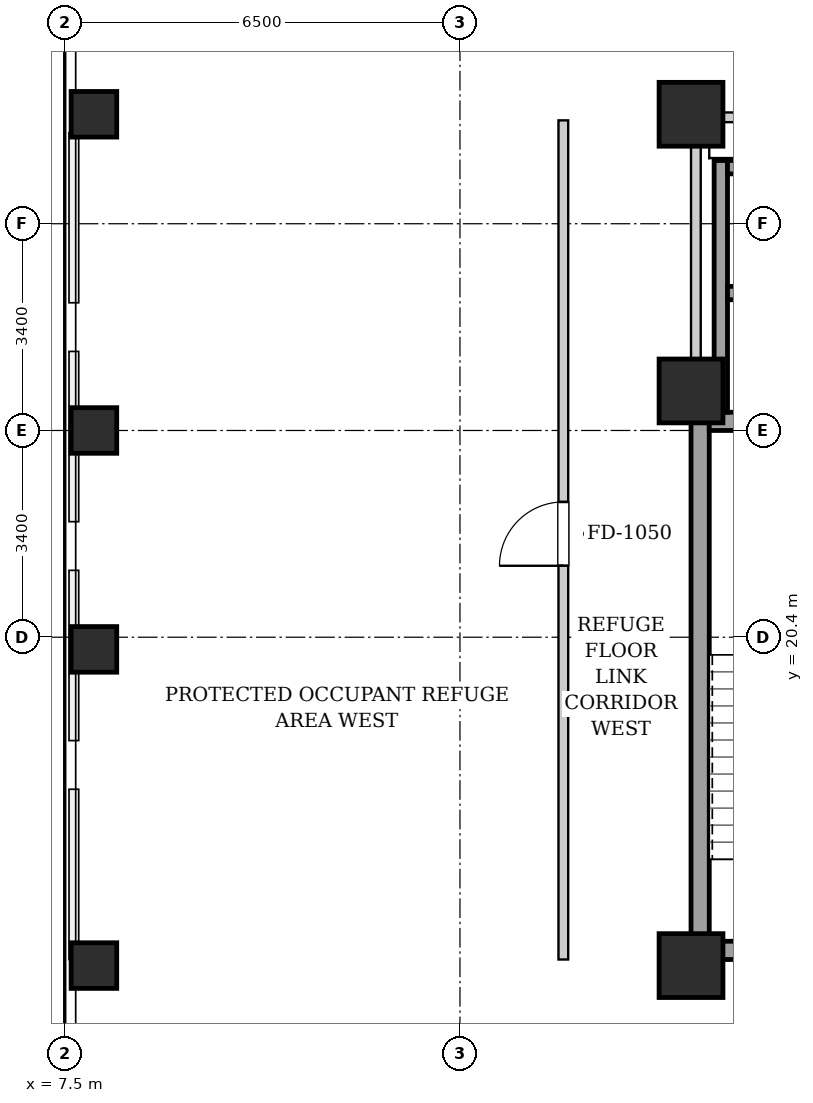
"""IFC4 building model, lengths in metres.
Left out: names, types, materials, properties, quantities, classifications, styles, units other than length and angle.
Written with IfcOpenShell. Run it as: python <this file> out.ifc"""

import sys

from ifc_helpers import new_model, si_unit, direction, frame, frame_2d, origin, origin_2d, place, context, subcontext, project, spatial, rectangle, extrude, element, fill, save


model = new_model("IFC4")
c1 = context("Model", 3, precision=1e-05, world=origin(), true_north=direction((0.0, 1.0)))
c2 = subcontext(c1, "Body", "Model", "MODEL_VIEW")
j1 = project(units=[si_unit("LENGTHUNIT", "METRE"), si_unit("PLANEANGLEUNIT", "RADIAN")], contexts=[c1])
p1 = place(None, origin())
s1 = spatial("IfcSite", under=j1, at=p1, CompositionType="ELEMENT")
p2 = place(p1, origin())
s2 = spatial("IfcBuilding", under=s1, at=p2, CompositionType="ELEMENT")
p3 = place(p2, frame((0.0, 0.0, 119.9)))
s3 = spatial("IfcBuildingStorey", under=s2, at=p3, CompositionType="ELEMENT", Elevation=119.9)
for number, where, z_axis, x_axis in (
    (1, (7.98, 15.0, 0.0), (0.0, 0.0, 1.0), (1.0, 0.0, 0.0)),
    (2, (7.98, 20.2, 0.0), (0.0, 0.0, 1.0), (1.0, 0.0, 0.0)),
    (3, (7.98, 23.8, 0.0), (0.0, 0.0, 1.0), (1.0, 0.0, 0.0)),
    (4, (7.98, 29.0, 0.0), (0.0, 0.0, 1.0), (1.0, 0.0, 0.0)),
):
    element("IfcColumn", number, at=place(p3, frame(where, z_axis=z_axis, x_axis=x_axis)), inside=s3, PredefinedType="COLUMN", context=c2, shape_type="SweptSolid", body=[
        extrude(rectangle(XDim=0.75, YDim=0.75, at=origin_2d()), origin(), (0.0, 0.0, 1.0), 4.5),
    ])
for number, where, z_axis, x_axis in (
    (5, (17.8, 15.0, 0.0), (0.0, 0.0, 1.0), (1.0, 0.0, 0.0)),
    (6, (17.8, 29.0, 0.0), (0.0, 0.0, 1.0), (1.0, 0.0, 0.0)),
    (7, (17.8, 24.45, 0.0), (0.0, 0.0, 1.0), (1.0, 0.0, 0.0)),
):
    element("IfcColumn", number, at=place(p3, frame(where, z_axis=z_axis, x_axis=x_axis)), inside=s3, PredefinedType="COLUMN", context=c2, shape_type="SweptSolid", body=[
        extrude(rectangle(XDim=1.05, YDim=1.05, at=origin_2d()), origin(), (0.0, 0.0, 1.0), 4.5),
    ])
p4 = place(p3, frame((17.95, 15.1, 0.0), z_axis=(0.0, 0.0, 1.0), x_axis=(0.0, 1.0, 0.0)))
e8 = element("IfcWall", 8, at=p4, inside=s3, PredefinedType="SHEAR", context=c2, shape_type="SweptSolid", body=[
    extrude(rectangle(XDim=9.0, YDim=0.3, at=frame_2d((4.5, 0.0))), origin(), (0.0, 0.0, 1.0), 4.18),
])
p5 = place(p3, frame((18.1, 23.95, 0.0), z_axis=(0.0, 0.0, 1.0), x_axis=(1.0, 0.0, 0.0)))
e9 = element("IfcWall", 9, at=p5, inside=s3, PredefinedType="SHEAR", context=c2, shape_type="SweptSolid", body=[
    extrude(rectangle(XDim=2.85, YDim=0.3, at=frame_2d((1.425, 0.0))), origin(), (0.0, 0.0, 1.0), 4.18),
])
p6 = place(p3, frame((18.1, 15.25, 0.0), z_axis=(0.0, 0.0, 1.0), x_axis=(1.0, 0.0, 0.0)))
e10 = element("IfcWall", 10, at=p6, inside=s3, PredefinedType="SHEAR", context=c2, shape_type="SweptSolid", body=[
    extrude(rectangle(XDim=2.85, YDim=0.3, at=frame_2d((1.425, 0.0))), origin(), (0.0, 0.0, 1.0), 4.18),
])
p7 = place(p6, frame((0.86, 0.0, 0.0)))
e11 = element("IfcOpeningElement", 11, at=p7, cuts=e10, PredefinedType="OPENING", context=c2, shape_type="SweptSolid", body=[
    extrude(rectangle(XDim=1.1, YDim=2.05, at=frame_2d((0.55, 1.025))), frame((0.0, 0.16, 0.0), z_axis=(0.0, -1.0, 0.0), x_axis=(1.0, 0.0, 0.0)), (0.0, 0.0, 1.0), 0.32),
])
p8 = place(p3, frame((18.29, 24.1, 0.0), z_axis=(0.0, 0.0, 1.0), x_axis=(0.0, 1.0, 0.0)))
e12 = element("IfcWall", 12, at=p8, inside=s3, PredefinedType="SHEAR", context=c2, shape_type="SweptSolid", body=[
    extrude(rectangle(XDim=4.14, YDim=0.22, at=frame_2d((2.07, 0.0))), origin(), (0.0, 0.0, 1.0), 4.18),
])
for number, where, z_axis, x_axis in (
    (13, (18.4, 26.06, 0.0), (0.0, 0.0, 1.0), (1.0, 0.0, 0.0)),
    (14, (18.4, 28.13, 0.0), (0.0, 0.0, 1.0), (1.0, 0.0, 0.0)),
):
    element("IfcWall", number, at=place(p3, frame(where, z_axis=z_axis, x_axis=x_axis)), inside=s3, PredefinedType="SHEAR", context=c2, shape_type="SweptSolid", body=[
        extrude(rectangle(XDim=1.9, YDim=0.22, at=frame_2d((0.95, 0.0))), origin(), (0.0, 0.0, 1.0), 4.18),
    ])
p9 = place(p3, frame((17.88, 24.12, 0.0), z_axis=(0.0, 0.0, 1.0), x_axis=(0.0, 1.0, 0.0)))
e15 = element("IfcWall", 15, at=p9, inside=s3, PredefinedType="PARTITIONING", context=c2, shape_type="SweptSolid", body=[
    extrude(rectangle(XDim=4.76, YDim=0.16, at=frame_2d((2.38, 0.0))), origin(), (0.0, 0.0, 1.0), 4.18),
])
p10 = place(p3, frame((17.96, 28.95, 0.0), z_axis=(0.0, 0.0, 1.0), x_axis=(1.0, 0.0, 0.0)))
e16 = element("IfcWall", 16, at=p10, inside=s3, PredefinedType="PARTITIONING", context=c2, shape_type="SweptSolid", body=[
    extrude(rectangle(XDim=4.29, YDim=0.16, at=frame_2d((2.145, 0.0))), origin(), (0.0, 0.0, 1.0), 4.18),
])
p11 = place(p10, frame((1.645, 0.0, 0.0)))
e17 = element("IfcOpeningElement", 17, at=p11, cuts=e16, PredefinedType="OPENING", context=c2, shape_type="SweptSolid", body=[
    extrude(rectangle(XDim=0.86, YDim=2.05, at=frame_2d((0.43, 1.025))), frame((0.0, 0.09, 0.0), z_axis=(0.0, -1.0, 0.0), x_axis=(1.0, 0.0, 0.0)), (0.0, 0.0, 1.0), 0.18),
])
p12 = place(p3, frame((15.7, 15.1, 0.0), z_axis=(0.0, 0.0, 1.0), x_axis=(0.0, 1.0, 0.0)))
e18 = element("IfcWall", 18, at=p12, inside=s3, PredefinedType="PARTITIONING", context=c2, shape_type="SweptSolid", body=[
    extrude(rectangle(XDim=13.8, YDim=0.16, at=frame_2d((6.9, 0.0))), origin(), (0.0, 0.0, 1.0), 4.18),
])
p13 = place(p12, frame((6.475, 0.0, 0.0)))
e19 = element("IfcOpeningElement", 19, at=p13, cuts=e18, PredefinedType="OPENING", context=c2, shape_type="SweptSolid", body=[
    extrude(rectangle(XDim=1.05, YDim=2.05, at=frame_2d((0.525, 1.025))), frame((0.0, 0.09, 0.0), z_axis=(0.0, -1.0, 0.0), x_axis=(1.0, 0.0, 0.0)), (0.0, 0.0, 1.0), 0.18),
])
p14 = place(p13, origin())
e20 = element("IfcDoor", 20, at=p14, inside=s3, OperationType="SINGLE_SWING_LEFT", PredefinedType="DOOR", context=c2, shape_type="SweptSolid", body=[
    extrude(rectangle(XDim=1.05, YDim=2.05, at=frame_2d((0.525, 1.025))), frame((0.0, 0.025, 0.0), z_axis=(0.0, -1.0, 0.0), x_axis=(1.0, 0.0, 0.0)), (0.0, 0.0, 1.0), 0.05),
])
fill(e19, e20)
save(model, sys.argv[1])
